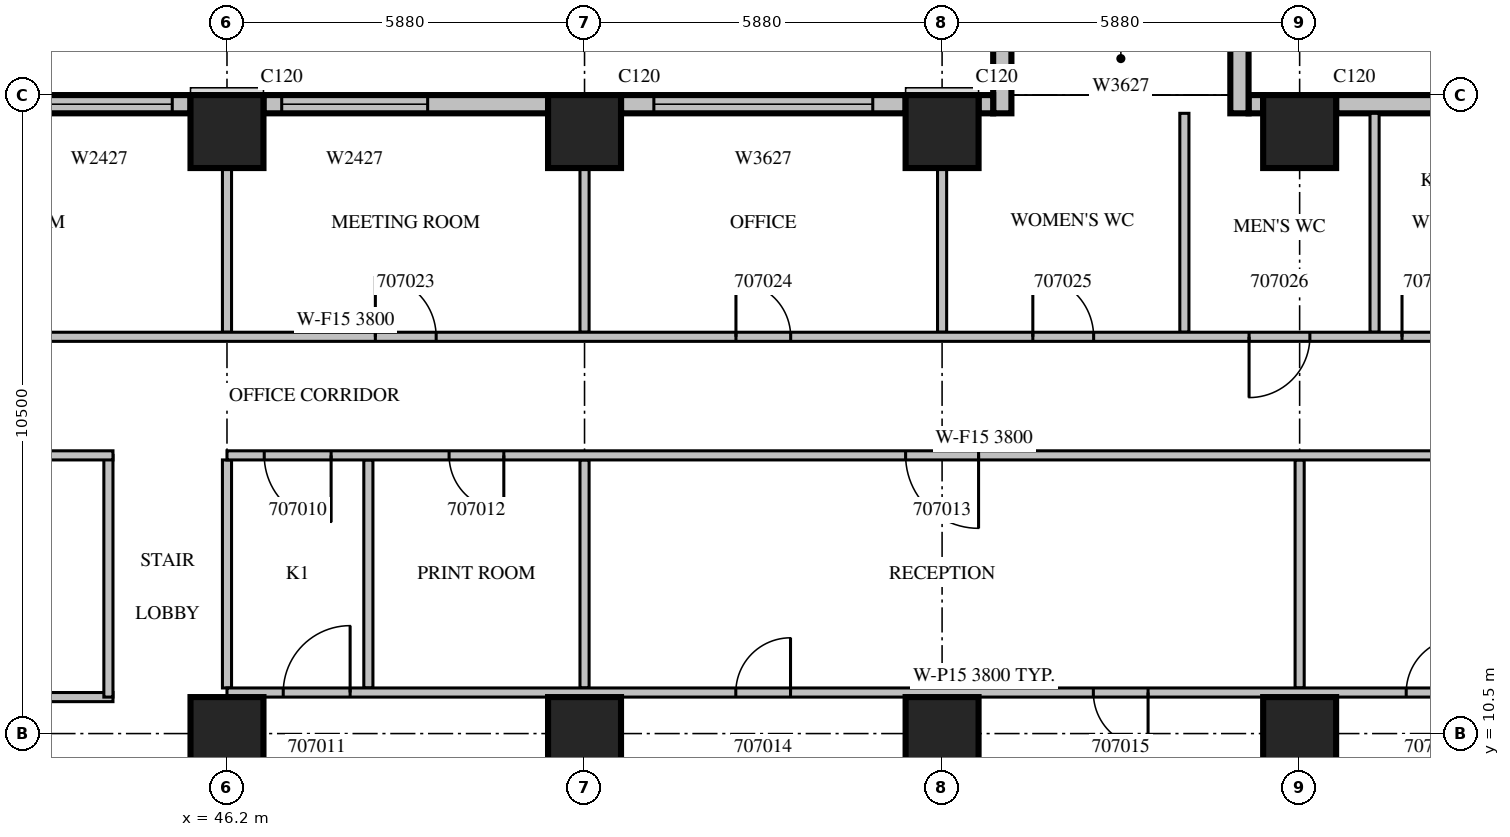
"""IFC4 building model, lengths in metres.
Left out: names, types, materials, properties, quantities, classifications, styles, units other than length and angle.
Written with IfcOpenShell. Run it as: python <this file> out.ifc"""

import sys

from ifc_helpers import new_model, si_unit, direction, frame, frame_2d, origin, origin_2d, place, context, subcontext, project, spatial, rectangle, extrude, source, transform, mapped, element, fill, save


model = new_model("IFC4")
c1 = context("Model", 3, precision=1e-05, world=origin(), true_north=direction((0.0, 1.0)))
c2 = subcontext(c1, "Body", "Model", "MODEL_VIEW")
j1 = project(units=[si_unit("LENGTHUNIT", "METRE"), si_unit("PLANEANGLEUNIT", "RADIAN")], contexts=[c1])
p1 = place(None, origin())
s1 = spatial("IfcSite", under=j1, at=p1, CompositionType="ELEMENT")
p2 = place(p1, origin())
s2 = spatial("IfcBuilding", under=s1, at=p2, CompositionType="ELEMENT")
p3 = place(p2, frame((0.0, 0.0, 40.5)))
s3 = spatial("IfcBuildingStorey", under=s2, at=p3, CompositionType="ELEMENT", Elevation=40.5)
m1 = source(origin(), c2, "Body", "SweptSolid", [
    extrude(rectangle(XDim=1.2, YDim=1.2, at=origin_2d()), origin(), (0.0, 0.0, 1.0), 4.2),
])
for number, where, z_axis, x_axis in (
    (1, (46.2, 10.5, 0.0), (0.0, 0.0, 1.0), (1.0, 0.0, 0.0)),
    (2, (52.08, 10.5, 0.0), (0.0, 0.0, 1.0), (1.0, 0.0, 0.0)),
    (3, (57.96, 10.5, 0.0), (0.0, 0.0, 1.0), (1.0, 0.0, 0.0)),
    (4, (63.84, 10.5, 0.0), (0.0, 0.0, 1.0), (1.0, 0.0, 0.0)),
    (5, (46.2, 20.4, 0.0), (0.0, 0.0, 1.0), (1.0, 0.0, 0.0)),
    (6, (52.08, 20.4, 0.0), (0.0, 0.0, 1.0), (1.0, 0.0, 0.0)),
    (7, (57.96, 20.4, 0.0), (0.0, 0.0, 1.0), (1.0, 0.0, 0.0)),
    (8, (63.84, 20.4, 0.0), (0.0, 0.0, 1.0), (1.0, 0.0, 0.0)),
):
    element("IfcColumn", number, at=place(p3, frame(where, z_axis=z_axis, x_axis=x_axis)), inside=s3, PredefinedType="COLUMN", context=c2, shape_type="MappedRepresentation", body=[
        mapped(m1, transform((0.0, 0.0, 0.0), scale=1.0)),
    ])
m2 = source(origin(), c2, "Body", "SweptSolid", [
    extrude(rectangle(XDim=2.76, YDim=0.3, at=frame_2d((1.38, 0.0))), origin(), (0.0, 0.0, 1.0), 3.8),
])
p4 = place(p3, frame((67.2, 20.85, 0.0), z_axis=(0.0, 0.0, 1.0), x_axis=(-1.0, 0.0, 0.0)))
e9 = element("IfcWall", 9, at=p4, inside=s3, PredefinedType="STANDARD", context=c2, shape_type="MappedRepresentation", body=[
    mapped(m2, transform((0.0, 0.0, 0.0), scale=1.0)),
])
p5 = place(p3, frame((63.24, 20.85, 0.0), z_axis=(0.0, 0.0, 1.0), x_axis=(-1.0, 0.0, 0.0)))
e10 = element("IfcWall", 10, at=p5, inside=s3, PredefinedType="STANDARD", context=c2, shape_type="SweptSolid", body=[
    extrude(rectangle(XDim=0.24, YDim=0.3, at=frame_2d((0.12, 0.0))), origin(), (0.0, 0.0, 1.0), 3.8),
])
p6 = place(p3, frame((62.85, 20.7, 0.0), z_axis=(0.0, 0.0, 1.0), x_axis=(0.0, 1.0, 0.0)))
e11 = element("IfcWall", 11, at=p6, inside=s3, PredefinedType="STANDARD", context=c2, shape_type="SweptSolid", body=[
    extrude(rectangle(XDim=1.2, YDim=0.3, at=frame_2d((0.6, 0.0))), origin(), (0.0, 0.0, 1.0), 3.8),
])
m3 = source(origin(), c2, "Body", "SweptSolid", [
    extrude(rectangle(XDim=1.2, YDim=0.3, at=frame_2d((0.6, 0.0))), origin(), (0.0, 0.0, 1.0), 3.8),
])
p7 = place(p3, frame((58.95, 20.7, 0.0), z_axis=(0.0, 0.0, 1.0), x_axis=(0.0, 1.0, 0.0)))
e12 = element("IfcWall", 12, at=p7, inside=s3, PredefinedType="STANDARD", context=c2, shape_type="MappedRepresentation", body=[
    mapped(m3, transform((0.0, 0.0, 0.0), scale=1.0)),
])
m4 = source(origin(), c2, "Body", "SweptSolid", [
    extrude(rectangle(XDim=0.24, YDim=0.3, at=frame_2d((0.12, 0.0))), origin(), (0.0, 0.0, 1.0), 3.8),
])
p8 = place(p3, frame((58.8, 20.85, 0.0), z_axis=(0.0, 0.0, 1.0), x_axis=(-1.0, 0.0, 0.0)))
e13 = element("IfcWall", 13, at=p8, inside=s3, PredefinedType="STANDARD", context=c2, shape_type="MappedRepresentation", body=[
    mapped(m4, transform((0.0, 0.0, 0.0), scale=1.0)),
])
m5 = source(origin(), c2, "Body", "SweptSolid", [
    extrude(rectangle(XDim=4.68, YDim=0.3, at=frame_2d((2.34, 0.0))), origin(), (0.0, 0.0, 1.0), 3.8),
])
p9 = place(p3, frame((57.36, 20.85, 0.0), z_axis=(0.0, 0.0, 1.0), x_axis=(-1.0, 0.0, 0.0)))
e14 = element("IfcWall", 14, at=p9, inside=s3, PredefinedType="STANDARD", context=c2, shape_type="MappedRepresentation", body=[
    mapped(m5, transform((0.0, 0.0, 0.0), scale=1.0)),
])
m6 = source(origin(), c2, "Body", "SweptSolid", [
    extrude(rectangle(XDim=3.6, YDim=2.7, at=frame_2d((1.8, 1.35))), frame((0.0, 0.16, 0.0), z_axis=(0.0, -1.0, 0.0), x_axis=(1.0, 0.0, 0.0)), (0.0, 0.0, 1.0), 0.32),
])
p10 = place(p9, frame((0.54, 0.0, 0.6)))
e15 = element("IfcOpeningElement", 15, at=p10, cuts=e14, PredefinedType="OPENING", context=c2, shape_type="MappedRepresentation", body=[
    mapped(m6, transform((0.0, 0.0, 0.0), scale=1.0)),
])
p11 = place(p3, frame((51.48, 20.85, 0.0), z_axis=(0.0, 0.0, 1.0), x_axis=(-1.0, 0.0, 0.0)))
e16 = element("IfcWall", 16, at=p11, inside=s3, PredefinedType="STANDARD", context=c2, shape_type="MappedRepresentation", body=[
    mapped(m5, transform((0.0, 0.0, 0.0), scale=1.0)),
])
m7 = source(origin(), c2, "Body", "SweptSolid", [
    extrude(rectangle(XDim=2.4, YDim=2.7, at=frame_2d((1.2, 1.35))), frame((0.0, 0.16, 0.0), z_axis=(0.0, -1.0, 0.0), x_axis=(1.0, 0.0, 0.0)), (0.0, 0.0, 1.0), 0.32),
])
p12 = place(p11, frame((1.98, 0.0, 0.6)))
e17 = element("IfcOpeningElement", 17, at=p12, cuts=e16, PredefinedType="OPENING", context=c2, shape_type="MappedRepresentation", body=[
    mapped(m7, transform((0.0, 0.0, 0.0), scale=1.0)),
])
p13 = place(p3, frame((45.6, 20.85, 0.0), z_axis=(0.0, 0.0, 1.0), x_axis=(-1.0, 0.0, 0.0)))
e18 = element("IfcWall", 18, at=p13, inside=s3, PredefinedType="STANDARD", context=c2, shape_type="SweptSolid", body=[
    extrude(rectangle(XDim=3.6, YDim=0.3, at=frame_2d((1.8, 0.0))), origin(), (0.0, 0.0, 1.0), 3.8),
])
p14 = place(p13, frame((0.3, 0.0, 0.6)))
e19 = element("IfcOpeningElement", 19, at=p14, cuts=e18, PredefinedType="OPENING", context=c2, shape_type="MappedRepresentation", body=[
    mapped(m7, transform((0.0, 0.0, 0.0), scale=1.0)),
])
p15 = place(p3, frame((37.875, 11.1, 0.0), z_axis=(0.0, 0.0, 1.0), x_axis=(1.0, 0.0, 0.0)))
e20 = element("IfcWall", 20, at=p15, inside=s3, PredefinedType="PARTITIONING", context=c2, shape_type="SweptSolid", body=[
    extrude(rectangle(XDim=6.45, YDim=0.15, at=frame_2d((3.225, 0.0))), origin(), (0.0, 0.0, 1.0), 3.8),
])
p16 = place(p3, frame((44.25, 11.1, 0.0), z_axis=(0.0, 0.0, 1.0), x_axis=(0.0, 1.0, 0.0)))
e21 = element("IfcWall", 21, at=p16, inside=s3, PredefinedType="PARTITIONING", context=c2, shape_type="SweptSolid", body=[
    extrude(rectangle(XDim=3.975, YDim=0.15, at=frame_2d((1.988, 0.0))), origin(), (0.0, 0.0, 1.0), 3.8),
])
m8 = source(origin(), c2, "Body", "SweptSolid", [
    extrude(rectangle(XDim=6.45, YDim=0.15, at=frame_2d((3.225, 0.0))), origin(), (0.0, 0.0, 1.0), 3.8),
])
p17 = place(p3, frame((44.325, 15.075, 0.0), z_axis=(0.0, 0.0, 1.0), x_axis=(-1.0, 0.0, 0.0)))
e22 = element("IfcWall", 22, at=p17, inside=s3, PredefinedType="PARTITIONING", context=c2, shape_type="MappedRepresentation", body=[
    mapped(m8, transform((0.0, 0.0, 0.0), scale=1.0)),
])
m9 = source(origin(), c2, "Body", "SweptSolid", [
    extrude(rectangle(XDim=0.9, YDim=2.1, at=frame_2d((0.45, 1.05))), frame((0.0, 0.085, 0.0), z_axis=(0.0, -1.0, 0.0), x_axis=(1.0, 0.0, 0.0)), (0.0, 0.0, 1.0), 0.17),
])
p18 = place(p17, frame((2.812, 0.0, 0.0)))
e23 = element("IfcOpeningElement", 23, at=p18, cuts=e22, PredefinedType="OPENING", context=c2, shape_type="MappedRepresentation", body=[
    mapped(m9, transform((0.0, 0.0, 0.0), scale=1.0)),
])
m10 = source(origin(), c2, "Body", "SweptSolid", [
    extrude(rectangle(XDim=3.75, YDim=0.15, at=frame_2d((1.875, 0.0))), origin(), (0.0, 0.0, 1.0), 3.8),
])
for number, where, z_axis, x_axis in (
    (24, (48.525, 11.25, 0.0), (0.0, 0.0, 1.0), (0.0, 1.0, 0.0)),
    (25, (46.2, 11.25, 0.0), (0.0, 0.0, 1.0), (0.0, 1.0, 0.0)),
    (26, (52.08, 11.25, 0.0), (0.0, 0.0, 1.0), (0.0, 1.0, 0.0)),
    (27, (63.84, 11.25, 0.0), (0.0, 0.0, 1.0), (0.0, 1.0, 0.0)),
):
    element("IfcWall", number, at=place(p3, frame(where, z_axis=z_axis, x_axis=x_axis)), inside=s3, PredefinedType="PARTITIONING", context=c2, shape_type="MappedRepresentation", body=[
        mapped(m10, transform((0.0, 0.0, 0.0), scale=1.0)),
    ])
p19 = place(p3, frame((71.1, 11.175, 0.0), z_axis=(0.0, 0.0, 1.0), x_axis=(-1.0, 0.0, 0.0)))
e28 = element("IfcWall", 28, at=p19, inside=s3, PredefinedType="PARTITIONING", context=c2, shape_type="SweptSolid", body=[
    extrude(rectangle(XDim=24.9, YDim=0.15, at=frame_2d((12.45, 0.0))), origin(), (0.0, 0.0, 1.0), 3.8),
])
m11 = source(origin(), c2, "Body", "SweptSolid", [
    extrude(rectangle(XDim=1.1, YDim=2.1, at=frame_2d((0.55, 1.05))), frame((0.0, 0.085, 0.0), z_axis=(0.0, -1.0, 0.0), x_axis=(1.0, 0.0, 0.0)), (0.0, 0.0, 1.0), 0.17),
])
p20 = place(p19, frame((22.875, 0.0, 0.0)))
e29 = element("IfcOpeningElement", 29, at=p20, cuts=e28, PredefinedType="OPENING", context=c2, shape_type="MappedRepresentation", body=[
    mapped(m11, transform((0.0, 0.0, 0.0), scale=1.0)),
])
p21 = place(p19, frame((15.633, 0.0, 0.0)))
e30 = element("IfcOpeningElement", 30, at=p21, cuts=e28, PredefinedType="OPENING", context=c2, shape_type="MappedRepresentation", body=[
    mapped(m9, transform((0.0, 0.0, 0.0), scale=1.0)),
])
p22 = place(p19, frame((9.752, 0.0, 0.0)))
e31 = element("IfcOpeningElement", 31, at=p22, cuts=e28, PredefinedType="OPENING", context=c2, shape_type="MappedRepresentation", body=[
    mapped(m9, transform((0.0, 0.0, 0.0), scale=1.0)),
])
p23 = place(p19, frame((4.607, 0.0, 0.0)))
e32 = element("IfcOpeningElement", 32, at=p23, cuts=e28, PredefinedType="OPENING", context=c2, shape_type="MappedRepresentation", body=[
    mapped(m9, transform((0.0, 0.0, 0.0), scale=1.0)),
])
p24 = place(p19, frame((2.243, 0.0, 0.0)))
e33 = element("IfcOpeningElement", 33, at=p24, cuts=e28, PredefinedType="OPENING", context=c2, shape_type="MappedRepresentation", body=[
    mapped(m9, transform((0.0, 0.0, 0.0), scale=1.0)),
])
m12 = source(origin(), c2, "Body", "SweptSolid", [
    extrude(rectangle(XDim=3.6, YDim=0.15, at=frame_2d((1.8, 0.0))), origin(), (0.0, 0.0, 1.0), 3.8),
])
for number, where, z_axis, x_axis in (
    (34, (61.944, 20.7, 0.0), (0.0, 0.0, 1.0), (0.0, -1.0, 0.0)),
    (35, (65.072, 20.7, 0.0), (0.0, 0.0, 1.0), (0.0, -1.0, 0.0)),
):
    element("IfcWall", number, at=place(p3, frame(where, z_axis=z_axis, x_axis=x_axis)), inside=s3, PredefinedType="PARTITIONING", context=c2, shape_type="MappedRepresentation", body=[
        mapped(m12, transform((0.0, 0.0, 0.0), scale=1.0)),
    ])
m13 = source(origin(), c2, "Body", "SweptSolid", [
    extrude(rectangle(XDim=2.701, YDim=0.15, at=frame_2d((1.351, 0.0))), origin(), (0.0, 0.0, 1.0), 3.8),
])
for number, where, z_axis, x_axis in (
    (36, (46.2, 17.1, 0.0), (0.0, 0.0, 1.0), (0.0, 1.0, 0.0)),
    (37, (52.08, 17.1, 0.0), (0.0, 0.0, 1.0), (0.0, 1.0, 0.0)),
    (38, (57.96, 17.1, 0.0), (0.0, 0.0, 1.0), (0.0, 1.0, 0.0)),
):
    element("IfcWall", number, at=place(p3, frame(where, z_axis=z_axis, x_axis=x_axis)), inside=s3, PredefinedType="PARTITIONING", context=c2, shape_type="MappedRepresentation", body=[
        mapped(m13, transform((0.0, 0.0, 0.0), scale=1.0)),
    ])
m14 = source(origin(), c2, "Body", "SweptSolid", [
    extrude(rectangle(XDim=24.9, YDim=0.15, at=frame_2d((12.45, 0.0))), origin(), (0.0, 0.0, 1.0), 3.8),
])
p25 = place(p3, frame((71.1, 15.075, 0.0), z_axis=(0.0, 0.0, 1.0), x_axis=(-1.0, 0.0, 0.0)))
e39 = element("IfcWall", 39, at=p25, inside=s3, PredefinedType="PARTITIONING", context=c2, shape_type="MappedRepresentation", body=[
    mapped(m14, transform((0.0, 0.0, 0.0), scale=1.0)),
])
p26 = place(p25, frame((23.188, 0.0, 0.0)))
e40 = element("IfcOpeningElement", 40, at=p26, cuts=e39, PredefinedType="OPENING", context=c2, shape_type="SweptSolid", body=[
    extrude(rectangle(XDim=1.1, YDim=2.1, at=frame_2d((0.55, 1.05))), frame((0.0, 0.085, 0.0), z_axis=(0.0, -1.0, 0.0), x_axis=(1.0, 0.0, 0.0)), (0.0, 0.0, 1.0), 0.17),
])
p27 = place(p25, frame((20.348, 0.0, 0.0)))
e41 = element("IfcOpeningElement", 41, at=p27, cuts=e39, PredefinedType="OPENING", context=c2, shape_type="MappedRepresentation", body=[
    mapped(m9, transform((0.0, 0.0, 0.0), scale=1.0)),
])
m15 = source(origin(), c2, "Body", "SweptSolid", [
    extrude(rectangle(XDim=1.2, YDim=2.1, at=frame_2d((0.6, 1.05))), frame((0.0, 0.085, 0.0), z_axis=(0.0, -1.0, 0.0), x_axis=(1.0, 0.0, 0.0)), (0.0, 0.0, 1.0), 0.17),
])
p28 = place(p25, frame((12.54, 0.0, 0.0)))
e42 = element("IfcOpeningElement", 42, at=p28, cuts=e39, PredefinedType="OPENING", context=c2, shape_type="MappedRepresentation", body=[
    mapped(m15, transform((0.0, 0.0, 0.0), scale=1.0)),
])
p29 = place(p25, frame((2.993, 0.0, 0.0)))
e43 = element("IfcOpeningElement", 43, at=p29, cuts=e39, PredefinedType="OPENING", context=c2, shape_type="MappedRepresentation", body=[
    mapped(m15, transform((0.0, 0.0, 0.0), scale=1.0)),
])
p30 = place(p3, frame((29.4, 17.025, 0.0), z_axis=(0.0, 0.0, 1.0), x_axis=(1.0, 0.0, 0.0)))
e44 = element("IfcWall", 44, at=p30, inside=s3, PredefinedType="PARTITIONING", context=c2, shape_type="SweptSolid", body=[
    extrude(rectangle(XDim=37.5, YDim=0.15, at=frame_2d((18.75, 0.0))), origin(), (0.0, 0.0, 1.0), 3.8),
])
m16 = source(origin(), c2, "Body", "SweptSolid", [
    extrude(rectangle(XDim=1.0, YDim=2.1, at=frame_2d((0.5, 1.05))), frame((0.0, 0.085, 0.0), z_axis=(0.0, -1.0, 0.0), x_axis=(1.0, 0.0, 0.0)), (0.0, 0.0, 1.0), 0.17),
])
p31 = place(p30, frame((1.357, 0.0, 0.0)))
e45 = element("IfcOpeningElement", 45, at=p31, cuts=e44, PredefinedType="OPENING", context=c2, shape_type="MappedRepresentation", body=[
    mapped(m16, transform((0.0, 0.0, 0.0), scale=1.0)),
])
p32 = place(p30, frame((4.669, 0.0, 0.0)))
e46 = element("IfcOpeningElement", 46, at=p32, cuts=e44, PredefinedType="OPENING", context=c2, shape_type="MappedRepresentation", body=[
    mapped(m16, transform((0.0, 0.0, 0.0), scale=1.0)),
])
p33 = place(p30, frame((7.012, 0.0, 0.0)))
e47 = element("IfcOpeningElement", 47, at=p33, cuts=e44, PredefinedType="OPENING", context=c2, shape_type="MappedRepresentation", body=[
    mapped(m16, transform((0.0, 0.0, 0.0), scale=1.0)),
])
p34 = place(p30, frame((12.0, 0.0, 0.0)))
e48 = element("IfcOpeningElement", 48, at=p34, cuts=e44, PredefinedType="OPENING", context=c2, shape_type="MappedRepresentation", body=[
    mapped(m15, transform((0.0, 0.0, 0.0), scale=1.0)),
])
p35 = place(p30, frame((19.24, 0.0, 0.0)))
e49 = element("IfcOpeningElement", 49, at=p35, cuts=e44, PredefinedType="OPENING", context=c2, shape_type="MappedRepresentation", body=[
    mapped(m16, transform((0.0, 0.0, 0.0), scale=1.0)),
])
p36 = place(p30, frame((25.17, 0.0, 0.0)))
e50 = element("IfcOpeningElement", 50, at=p36, cuts=e44, PredefinedType="OPENING", context=c2, shape_type="MappedRepresentation", body=[
    mapped(m9, transform((0.0, 0.0, 0.0), scale=1.0)),
])
p37 = place(p30, frame((30.052, 0.0, 0.0)))
e51 = element("IfcOpeningElement", 51, at=p37, cuts=e44, PredefinedType="OPENING", context=c2, shape_type="MappedRepresentation", body=[
    mapped(m16, transform((0.0, 0.0, 0.0), scale=1.0)),
])
p38 = place(p30, frame((33.608, 0.0, 0.0)))
e52 = element("IfcOpeningElement", 52, at=p38, cuts=e44, PredefinedType="OPENING", context=c2, shape_type="MappedRepresentation", body=[
    mapped(m16, transform((0.0, 0.0, 0.0), scale=1.0)),
])
p39 = place(p30, frame((36.124, 0.0, 0.0)))
e53 = element("IfcOpeningElement", 53, at=p39, cuts=e44, PredefinedType="OPENING", context=c2, shape_type="MappedRepresentation", body=[
    mapped(m16, transform((0.0, 0.0, 0.0), scale=1.0)),
])
m17 = source(origin(), c2, "Body", "SweptSolid", [
    extrude(rectangle(XDim=2.4, YDim=2.7, at=frame_2d((1.2, 1.35))), frame((0.0, 0.03, 0.0), z_axis=(0.0, -1.0, 0.0), x_axis=(1.0, 0.0, 0.0)), (0.0, 0.0, 1.0), 0.06),
])
p40 = place(p12, origin())
e54 = element("IfcWindow", 54, at=p40, inside=s3, PartitioningType="SINGLE_PANEL", PredefinedType="WINDOW", context=c2, shape_type="MappedRepresentation", body=[
    mapped(m17, transform((0.0, 0.0, 0.0), scale=1.0)),
])
fill(e17, e54)
m18 = source(origin(), c2, "Body", "SweptSolid", [
    extrude(rectangle(XDim=3.6, YDim=2.7, at=frame_2d((1.8, 1.35))), frame((0.0, 0.03, 0.0), z_axis=(0.0, -1.0, 0.0), x_axis=(1.0, 0.0, 0.0)), (0.0, 0.0, 1.0), 0.06),
])
p41 = place(p10, origin())
e55 = element("IfcWindow", 55, at=p41, inside=s3, PartitioningType="SINGLE_PANEL", PredefinedType="WINDOW", context=c2, shape_type="MappedRepresentation", body=[
    mapped(m18, transform((0.0, 0.0, 0.0), scale=1.0)),
])
fill(e15, e55)
p42 = place(p14, origin())
e56 = element("IfcWindow", 56, at=p42, inside=s3, PartitioningType="SINGLE_PANEL", PredefinedType="WINDOW", context=c2, shape_type="MappedRepresentation", body=[
    mapped(m17, transform((0.0, 0.0, 0.0), scale=1.0)),
])
fill(e19, e56)
m19 = source(origin(), c2, "Body", "SweptSolid", [
    extrude(rectangle(XDim=1.1, YDim=2.1, at=frame_2d((0.55, 1.05))), frame((0.0, 0.025, 0.0), z_axis=(0.0, -1.0, 0.0), x_axis=(1.0, 0.0, 0.0)), (0.0, 0.0, 1.0), 0.05),
])
p43 = place(p26, origin())
e57 = element("IfcDoor", 57, at=p43, inside=s3, OperationType="SINGLE_SWING_LEFT", PredefinedType="DOOR", context=c2, shape_type="MappedRepresentation", body=[
    mapped(m19, transform((0.0, 0.0, 0.0), scale=1.0)),
])
fill(e40, e57)
p44 = place(p20, origin())
e58 = element("IfcDoor", 58, at=p44, inside=s3, OperationType="SINGLE_SWING_RIGHT", PredefinedType="DOOR", context=c2, shape_type="MappedRepresentation", body=[
    mapped(m19, transform((0.0, 0.0, 0.0), scale=1.0)),
])
fill(e29, e58)
m20 = source(origin(), c2, "Body", "SweptSolid", [
    extrude(rectangle(XDim=0.9, YDim=2.1, at=frame_2d((0.45, 1.05))), frame((0.0, 0.025, 0.0), z_axis=(0.0, -1.0, 0.0), x_axis=(1.0, 0.0, 0.0)), (0.0, 0.0, 1.0), 0.05),
])
p45 = place(p27, origin())
e59 = element("IfcDoor", 59, at=p45, inside=s3, OperationType="SINGLE_SWING_LEFT", PredefinedType="DOOR", context=c2, shape_type="MappedRepresentation", body=[
    mapped(m20, transform((0.0, 0.0, 0.0), scale=1.0)),
])
fill(e41, e59)
m21 = source(origin(), c2, "Body", "SweptSolid", [
    extrude(rectangle(XDim=1.2, YDim=2.1, at=frame_2d((0.6, 1.05))), frame((0.0, 0.025, 0.0), z_axis=(0.0, -1.0, 0.0), x_axis=(1.0, 0.0, 0.0)), (0.0, 0.0, 1.0), 0.05),
])
p46 = place(p28, origin())
e60 = element("IfcDoor", 60, at=p46, inside=s3, OperationType="SINGLE_SWING_LEFT", PredefinedType="DOOR", context=c2, shape_type="MappedRepresentation", body=[
    mapped(m21, transform((0.0, 0.0, 0.0), scale=1.0)),
])
fill(e42, e60)
p47 = place(p21, origin())
e61 = element("IfcDoor", 61, at=p47, inside=s3, OperationType="SINGLE_SWING_RIGHT", PredefinedType="DOOR", context=c2, shape_type="MappedRepresentation", body=[
    mapped(m20, transform((0.0, 0.0, 0.0), scale=1.0)),
])
fill(e30, e61)
p48 = place(p22, origin())
e62 = element("IfcDoor", 62, at=p48, inside=s3, OperationType="SINGLE_SWING_LEFT", PredefinedType="DOOR", context=c2, shape_type="MappedRepresentation", body=[
    mapped(m20, transform((0.0, 0.0, 0.0), scale=1.0)),
])
fill(e31, e62)
p49 = place(p23, origin())
e63 = element("IfcDoor", 63, at=p49, inside=s3, OperationType="SINGLE_SWING_RIGHT", PredefinedType="DOOR", context=c2, shape_type="MappedRepresentation", body=[
    mapped(m20, transform((0.0, 0.0, 0.0), scale=1.0)),
])
fill(e32, e63)
m22 = source(origin(), c2, "Body", "SweptSolid", [
    extrude(rectangle(XDim=1.0, YDim=2.1, at=frame_2d((0.5, 1.05))), frame((0.0, 0.025, 0.0), z_axis=(0.0, -1.0, 0.0), x_axis=(1.0, 0.0, 0.0)), (0.0, 0.0, 1.0), 0.05),
])
p50 = place(p35, origin())
e64 = element("IfcDoor", 64, at=p50, inside=s3, OperationType="SINGLE_SWING_LEFT", PredefinedType="DOOR", context=c2, shape_type="MappedRepresentation", body=[
    mapped(m22, transform((0.0, 0.0, 0.0), scale=1.0)),
])
fill(e49, e64)
p51 = place(p36, origin())
e65 = element("IfcDoor", 65, at=p51, inside=s3, OperationType="SINGLE_SWING_LEFT", PredefinedType="DOOR", context=c2, shape_type="MappedRepresentation", body=[
    mapped(m20, transform((0.0, 0.0, 0.0), scale=1.0)),
])
fill(e50, e65)
p52 = place(p37, origin())
e66 = element("IfcDoor", 66, at=p52, inside=s3, OperationType="SINGLE_SWING_LEFT", PredefinedType="DOOR", context=c2, shape_type="MappedRepresentation", body=[
    mapped(m22, transform((0.0, 0.0, 0.0), scale=1.0)),
])
fill(e51, e66)
p53 = place(p38, origin())
e67 = element("IfcDoor", 67, at=p53, inside=s3, OperationType="SINGLE_SWING_RIGHT", PredefinedType="DOOR", context=c2, shape_type="MappedRepresentation", body=[
    mapped(m22, transform((0.0, 0.0, 0.0), scale=1.0)),
])
fill(e52, e67)
p54 = place(p39, origin())
e68 = element("IfcDoor", 68, at=p54, inside=s3, OperationType="SINGLE_SWING_LEFT", PredefinedType="DOOR", context=c2, shape_type="MappedRepresentation", body=[
    mapped(m22, transform((0.0, 0.0, 0.0), scale=1.0)),
])
fill(e53, e68)
save(model, sys.argv[1])
